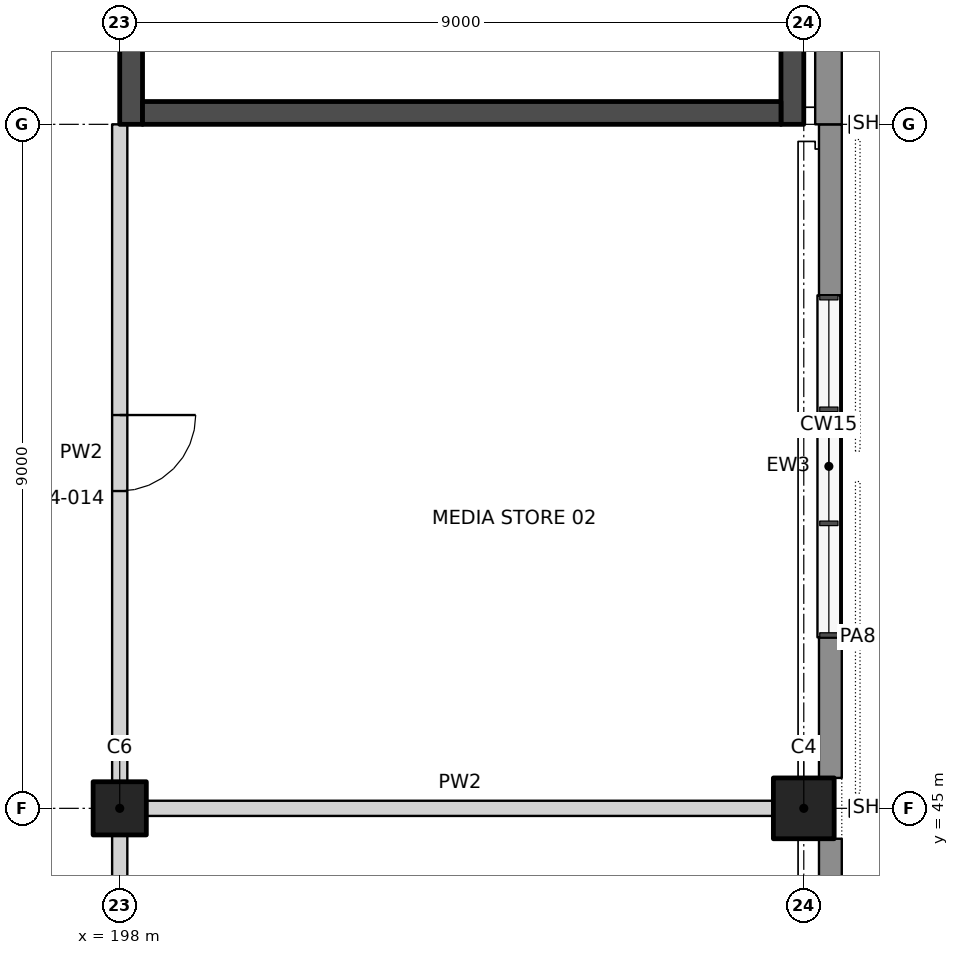
"""IFC4 building model, lengths in metres.
Left out: names, types, materials, properties, quantities, classifications, styles, units other than length and angle.
Written with IfcOpenShell. Run it as: python <this file> out.ifc"""

import sys

from ifc_helpers import new_model, si_unit, direction, frame, frame_2d, origin, origin_2d, place, context, subcontext, project, spatial, rectangle, extrude, element, fill, save


model = new_model("IFC4")
c1 = context("Model", 3, precision=1e-05, world=origin(), true_north=direction((0.0, 1.0)))
c2 = subcontext(c1, "Body", "Model", "MODEL_VIEW")
j1 = project(units=[si_unit("LENGTHUNIT", "METRE"), si_unit("PLANEANGLEUNIT", "RADIAN")], contexts=[c1])
p1 = place(None, origin())
s1 = spatial("IfcSite", under=j1, at=p1, CompositionType="ELEMENT")
p2 = place(p1, origin())
s2 = spatial("IfcBuilding", under=s1, at=p2, CompositionType="ELEMENT")
p3 = place(p2, frame((0.0, 0.0, 28.0)))
s3 = spatial("IfcBuildingStorey", under=s2, at=p3, CompositionType="ELEMENT", Elevation=28.0)
p4 = place(p3, frame((207.0, 45.0, 0.0), z_axis=(0.0, 0.0, 1.0), x_axis=(1.0, 0.0, 0.0)))
e1 = element("IfcColumn", 1, at=p4, inside=s3, PredefinedType="COLUMN", context=c2, shape_type="SweptSolid", body=[
    extrude(rectangle(XDim=0.8, YDim=0.8, at=origin_2d()), origin(), (0.0, 0.0, 1.0), 5.5),
])
p5 = place(p3, frame((198.0, 45.0, 0.0), z_axis=(0.0, 0.0, 1.0), x_axis=(1.0, 0.0, 0.0)))
e2 = element("IfcColumn", 2, at=p5, inside=s3, PredefinedType="COLUMN", context=c2, shape_type="SweptSolid", body=[
    extrude(rectangle(XDim=0.7, YDim=0.7, at=origin_2d()), origin(), (0.0, 0.0, 1.0), 5.5),
])
p6 = place(p3, frame((198.35, 45.0, 0.0), z_axis=(0.0, 0.0, 1.0), x_axis=(1.0, 0.0, 0.0)))
e3 = element("IfcWall", 3, at=p6, inside=s3, PredefinedType="PARTITIONING", context=c2, shape_type="SweptSolid", body=[
    extrude(rectangle(XDim=8.25, YDim=0.2, at=frame_2d((4.125, 0.0))), origin(), (0.0, 0.0, 1.0), 9.5),
])
p7 = place(p3, frame((198.0, 42.1, 0.0), z_axis=(0.0, 0.0, 1.0), x_axis=(0.0, 1.0, 0.0)))
e4 = element("IfcWall", 4, at=p7, inside=s3, PredefinedType="PARTITIONING", context=c2, shape_type="SweptSolid", body=[
    extrude(rectangle(XDim=2.55, YDim=0.2, at=frame_2d((1.275, 0.0))), origin(), (0.0, 0.0, 1.0), 4.2),
])
p8 = place(p3, frame((198.0, 45.35, 0.0), z_axis=(0.0, 0.0, 1.0), x_axis=(0.0, 1.0, 0.0)))
e5 = element("IfcWall", 5, at=p8, inside=s3, PredefinedType="PARTITIONING", context=c2, shape_type="SweptSolid", body=[
    extrude(rectangle(XDim=8.65, YDim=0.2, at=frame_2d((4.325, 0.0))), origin(), (0.0, 0.0, 1.0), 4.2),
])
p9 = place(p8, frame((3.825, 0.0, 0.0)))
e6 = element("IfcOpeningElement", 6, at=p9, cuts=e5, PredefinedType="OPENING", context=c2, shape_type="SweptSolid", body=[
    extrude(rectangle(XDim=1.0, YDim=2.1, at=frame_2d((0.5, 1.05))), frame((0.0, 0.11, 0.0), z_axis=(0.0, -1.0, 0.0), x_axis=(1.0, 0.0, 0.0)), (0.0, 0.0, 1.0), 0.22),
])
p10 = place(p3, frame((207.35, 36.4, 0.0), z_axis=(0.0, 0.0, 1.0), x_axis=(0.0, 1.0, 0.0)))
e7 = element("IfcWall", 7, at=p10, inside=s3, PredefinedType="SOLIDWALL", context=c2, shape_type="SweptSolid", body=[
    extrude(rectangle(XDim=8.2, YDim=0.3, at=frame_2d((4.1, 0.0))), origin(), (0.0, 0.0, 1.0), 5.5),
])
p11 = place(p3, frame((207.35, 45.4, 0.0), z_axis=(0.0, 0.0, 1.0), x_axis=(0.0, 1.0, 0.0)))
e8 = element("IfcWall", 8, at=p11, inside=s3, PredefinedType="SOLIDWALL", context=c2, shape_type="SweptSolid", body=[
    extrude(rectangle(XDim=1.85, YDim=0.3, at=frame_2d((0.925, 0.0))), origin(), (0.0, 0.0, 1.0), 4.9),
])
p12 = place(p3, frame((207.35, 51.75, 0.0), z_axis=(0.0, 0.0, 1.0), x_axis=(0.0, 1.0, 0.0)))
e9 = element("IfcWall", 9, at=p12, inside=s3, PredefinedType="SOLIDWALL", context=c2, shape_type="SweptSolid", body=[
    extrude(rectangle(XDim=2.25, YDim=0.3, at=frame_2d((1.125, 0.0))), origin(), (0.0, 0.0, 1.0), 4.9),
])
p13 = place(p3, frame((207.35, 47.25, 0.0), z_axis=(0.0, 0.0, 1.0), x_axis=(0.0, 1.0, 0.0)))
e10 = element("IfcWall", 10, at=p13, inside=s3, PredefinedType="SOLIDWALL", context=c2, shape_type="SweptSolid", body=[
    extrude(rectangle(XDim=4.5, YDim=0.3, at=frame_2d((2.25, 0.0))), origin(), (0.0, 0.0, 1.0), 1.0),
])
p14 = place(p3, frame((207.325, 54.0, 0.0), z_axis=(0.0, 0.0, 1.0), x_axis=(0.0, 1.0, 0.0)))
e11 = element("IfcWall", 11, at=p14, inside=s3, PredefinedType="SOLIDWALL", context=c2, shape_type="SweptSolid", body=[
    extrude(rectangle(XDim=9.0, YDim=0.35, at=frame_2d((4.5, 0.0))), origin(), (0.0, 0.0, 1.0), 5.5),
])
p15 = place(p3, frame((198.15, 54.0, 0.0), z_axis=(0.0, 0.0, 1.0), x_axis=(0.0, 1.0, 0.0)))
e12 = element("IfcWall", 12, at=p15, inside=s3, PredefinedType="SHEAR", context=c2, shape_type="SweptSolid", body=[
    extrude(rectangle(XDim=18.0, YDim=0.3, at=frame_2d((9.0, 0.0))), origin(), (0.0, 0.0, 1.0), 5.5),
])
p16 = place(p15, frame((1.5, 0.0, 0.0)))
e13 = element("IfcOpeningElement", 13, at=p16, cuts=e12, PredefinedType="OPENING", context=c2, shape_type="SweptSolid", body=[
    extrude(rectangle(XDim=1.2, YDim=2.1, at=frame_2d((0.6, 1.05))), frame((0.0, 0.16, 0.0), z_axis=(0.0, -1.0, 0.0), x_axis=(1.0, 0.0, 0.0)), (0.0, 0.0, 1.0), 0.32),
])
p17 = place(p3, frame((206.85, 54.0, 0.0), z_axis=(0.0, 0.0, 1.0), x_axis=(0.0, 1.0, 0.0)))
e14 = element("IfcWall", 14, at=p17, inside=s3, PredefinedType="SHEAR", context=c2, shape_type="SweptSolid", body=[
    extrude(rectangle(XDim=18.0, YDim=0.3, at=frame_2d((9.0, 0.0))), origin(), (0.0, 0.0, 1.0), 5.5),
])
p18 = place(p3, frame((198.3, 54.15, 0.0), z_axis=(0.0, 0.0, 1.0), x_axis=(1.0, 0.0, 0.0)))
e15 = element("IfcWall", 15, at=p18, inside=s3, PredefinedType="SHEAR", context=c2, shape_type="SweptSolid", body=[
    extrude(rectangle(XDim=8.4, YDim=0.3, at=frame_2d((4.2, 0.0))), origin(), (0.0, 0.0, 1.0), 5.5),
])
p19 = place(p9, frame((1.0, 0.0, 0.0), z_axis=(0.0, 0.0, 1.0), x_axis=(-1.0, 0.0, 0.0)))
e16 = element("IfcDoor", 16, at=p19, inside=s3, OperationType="SINGLE_SWING_LEFT", PredefinedType="DOOR", context=c2, shape_type="SweptSolid", body=[
    extrude(rectangle(XDim=1.0, YDim=2.1, at=frame_2d((0.5, 1.05))), frame((0.0, 0.025, 0.0), z_axis=(0.0, -1.0, 0.0), x_axis=(1.0, 0.0, 0.0)), (0.0, 0.0, 1.0), 0.05),
])
fill(e6, e16)
save(model, sys.argv[1])
